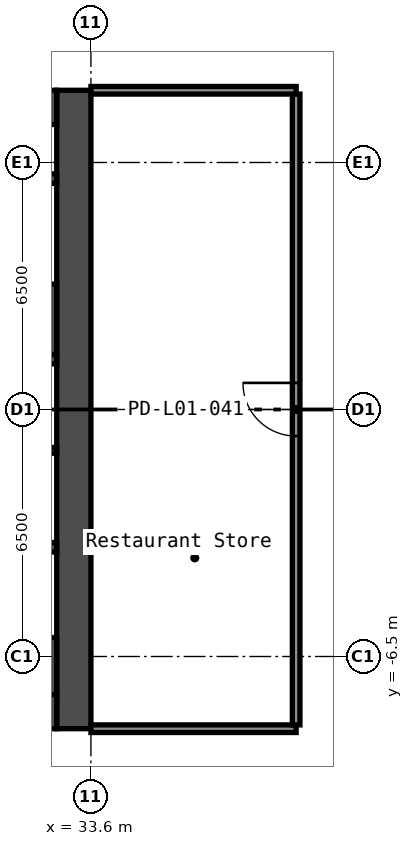
"""IFC4 building model, lengths in metres.
Left out: names, types, materials, properties, quantities, classifications, styles, units other than length and angle.
Written with IfcOpenShell. Run it as: python <this file> out.ifc"""

import sys

from ifc_helpers import new_model, si_unit, direction, frame, frame_2d, origin, place, context, subcontext, project, spatial, rectangle, extrude, element, fill, save


model = new_model("IFC4")
c1 = context("Model", 3, precision=1e-05, world=origin(), true_north=direction((0.0, 1.0)))
c2 = subcontext(c1, "Body", "Model", "MODEL_VIEW")
j1 = project(units=[si_unit("LENGTHUNIT", "METRE"), si_unit("PLANEANGLEUNIT", "RADIAN")], contexts=[c1])
p1 = place(None, origin())
s1 = spatial("IfcSite", under=j1, at=p1, CompositionType="ELEMENT")
p2 = place(p1, origin())
s2 = spatial("IfcBuilding", under=s1, at=p2, CompositionType="ELEMENT")
p3 = place(p2, origin())
s3 = spatial("IfcBuildingStorey", under=s2, at=p3, CompositionType="ELEMENT", Elevation=0.0)
p4 = place(p3, frame((33.15, -8.4, 0.0), z_axis=(0.0, 0.0, 1.0), x_axis=(0.0, 1.0, 0.0)))
e1 = element("IfcWall", 1, at=p4, inside=s3, PredefinedType="SHEAR", context=c2, shape_type="SweptSolid", body=[
    extrude(rectangle(XDim=16.8, YDim=0.9, at=frame_2d((8.4, 0.0))), origin(), (0.0, 0.0, 1.0), 8.6),
])
p5 = place(p3, frame((17.7, 7.95, 0.0), z_axis=(0.0, 0.0, 1.0), x_axis=(1.0, 0.0, 0.0)))
e2 = element("IfcWall", 2, at=p5, inside=s3, PredefinedType="SHEAR", context=c2, shape_type="SweptSolid", body=[
    extrude(rectangle(XDim=15.0, YDim=0.9, at=frame_2d((7.5, 0.0))), origin(), (0.0, 0.0, 1.0), 8.6),
])
p6 = place(p5, frame((10.4, 0.0, 0.0)))
e3 = element("IfcOpeningElement", 3, at=p6, cuts=e2, PredefinedType="OPENING", context=c2, shape_type="SweptSolid", body=[
    extrude(rectangle(XDim=1.2, YDim=2.1, at=frame_2d((0.6, 1.05))), frame((0.0, 0.46, 0.0), z_axis=(0.0, -1.0, 0.0), x_axis=(1.0, 0.0, 0.0)), (0.0, 0.0, 1.0), 0.92),
])
p7 = place(p5, frame((13.35, 0.0, 0.0)))
e4 = element("IfcOpeningElement", 4, at=p7, cuts=e2, PredefinedType="OPENING", context=c2, shape_type="SweptSolid", body=[
    extrude(rectangle(XDim=0.9, YDim=2.1, at=frame_2d((0.45, 1.05))), frame((0.0, 0.46, 0.0), z_axis=(0.0, -1.0, 0.0), x_axis=(1.0, 0.0, 0.0)), (0.0, 0.0, 1.0), 0.92),
])
p8 = place(p5, frame((6.75, 0.0, 0.0)))
e5 = element("IfcOpeningElement", 5, at=p8, cuts=e2, PredefinedType="OPENING", context=c2, shape_type="SweptSolid", body=[
    extrude(rectangle(XDim=1.2, YDim=2.1, at=frame_2d((0.6, 1.05))), frame((0.0, 0.46, 0.0), z_axis=(0.0, -1.0, 0.0), x_axis=(1.0, 0.0, 0.0)), (0.0, 0.0, 1.0), 0.92),
])
p9 = place(p3, frame((17.7, -7.95, 0.0), z_axis=(0.0, 0.0, 1.0), x_axis=(1.0, 0.0, 0.0)))
e6 = element("IfcWall", 6, at=p9, inside=s3, PredefinedType="SHEAR", context=c2, shape_type="SweptSolid", body=[
    extrude(rectangle(XDim=15.0, YDim=0.9, at=frame_2d((7.5, 0.0))), origin(), (0.0, 0.0, 1.0), 8.6),
])
p10 = place(p9, frame((2.55, 0.0, 0.0)))
e7 = element("IfcOpeningElement", 7, at=p10, cuts=e6, PredefinedType="OPENING", context=c2, shape_type="SweptSolid", body=[
    extrude(rectangle(XDim=1.0, YDim=2.1, at=frame_2d((0.5, 1.05))), frame((0.0, 0.46, 0.0), z_axis=(0.0, -1.0, 0.0), x_axis=(1.0, 0.0, 0.0)), (0.0, 0.0, 1.0), 0.92),
])
p11 = place(p9, frame((4.2, 0.0, 0.0)))
e8 = element("IfcOpeningElement", 8, at=p11, cuts=e6, PredefinedType="OPENING", context=c2, shape_type="SweptSolid", body=[
    extrude(rectangle(XDim=1.2, YDim=2.1, at=frame_2d((0.6, 1.05))), frame((0.0, 0.46, 0.0), z_axis=(0.0, -1.0, 0.0), x_axis=(1.0, 0.0, 0.0)), (0.0, 0.0, 1.0), 0.92),
])
p12 = place(p3, frame((27.65, 1.325, 0.0), z_axis=(0.0, 0.0, 1.0), x_axis=(1.0, 0.0, 0.0)))
e9 = element("IfcWall", 9, at=p12, inside=s3, PredefinedType="SHEAR", context=c2, shape_type="SweptSolid", body=[
    extrude(rectangle(XDim=5.05, YDim=0.25, at=frame_2d((2.525, 0.0))), origin(), (0.0, 0.0, 1.0), 8.6),
])
p13 = place(p12, frame((0.55, 0.0, 0.0)))
e10 = element("IfcOpeningElement", 10, at=p13, cuts=e9, PredefinedType="OPENING", context=c2, shape_type="SweptSolid", body=[
    extrude(rectangle(XDim=1.2, YDim=2.1, at=frame_2d((0.6, 1.05))), frame((0.0, 0.135, 0.0), z_axis=(0.0, -1.0, 0.0), x_axis=(1.0, 0.0, 0.0)), (0.0, 0.0, 1.0), 0.27),
])
p14 = place(p3, frame((30.3, 2.375, 0.0), z_axis=(0.0, 0.0, 1.0), x_axis=(1.0, 0.0, 0.0)))
e11 = element("IfcWall", 11, at=p14, inside=s3, PredefinedType="SHEAR", context=c2, shape_type="SweptSolid", body=[
    extrude(rectangle(XDim=2.4, YDim=1.85, at=frame_2d((1.2, 0.0))), origin(), (0.0, 0.0, 1.0), 8.6),
])
p15 = place(p3, frame((30.3, 6.075, 0.0), z_axis=(0.0, 0.0, 1.0), x_axis=(1.0, 0.0, 0.0)))
e12 = element("IfcWall", 12, at=p15, inside=s3, PredefinedType="SHEAR", context=c2, shape_type="SweptSolid", body=[
    extrude(rectangle(XDim=2.4, YDim=0.25, at=frame_2d((1.2, 0.0))), origin(), (0.0, 0.0, 1.0), 8.6),
])
p16 = place(p3, frame((28.15, -3.625, 0.0), z_axis=(0.0, 0.0, 1.0), x_axis=(1.0, 0.0, 0.0)))
e13 = element("IfcWall", 13, at=p16, inside=s3, PredefinedType="SHEAR", context=c2, shape_type="SweptSolid", body=[
    extrude(rectangle(XDim=4.55, YDim=0.25, at=frame_2d((2.275, 0.0))), origin(), (0.0, 0.0, 1.0), 8.6),
])
p17 = place(p16, frame((0.6, 0.0, 0.0)))
e14 = element("IfcOpeningElement", 14, at=p17, cuts=e13, PredefinedType="OPENING", context=c2, shape_type="SweptSolid", body=[
    extrude(rectangle(XDim=1.1, YDim=2.1, at=frame_2d((0.55, 1.05))), frame((0.0, 0.135, 0.0), z_axis=(0.0, -1.0, 0.0), x_axis=(1.0, 0.0, 0.0)), (0.0, 0.0, 1.0), 0.27),
])
p18 = place(p16, frame((2.85, 0.0, 0.0)))
e15 = element("IfcOpeningElement", 15, at=p18, cuts=e13, PredefinedType="OPENING", context=c2, shape_type="SweptSolid", body=[
    extrude(rectangle(XDim=1.1, YDim=2.1, at=frame_2d((0.55, 1.05))), frame((0.0, 0.135, 0.0), z_axis=(0.0, -1.0, 0.0), x_axis=(1.0, 0.0, 0.0)), (0.0, 0.0, 1.0), 0.27),
])
p19 = place(p3, frame((28.15, -6.75, 0.0), z_axis=(0.0, 0.0, 1.0), x_axis=(1.0, 0.0, 0.0)))
e16 = element("IfcWall", 16, at=p19, inside=s3, PredefinedType="SHEAR", context=c2, shape_type="SweptSolid", body=[
    extrude(rectangle(XDim=4.55, YDim=1.5, at=frame_2d((2.275, 0.0))), origin(), (0.0, 0.0, 1.0), 8.6),
])
p20 = place(p3, frame((29.7, -1.075, 0.0), z_axis=(0.0, 0.0, 1.0), x_axis=(1.0, 0.0, 0.0)))
e17 = element("IfcWall", 17, at=p20, inside=s3, PredefinedType="PARTITIONING", context=c2, shape_type="SweptSolid", body=[
    extrude(rectangle(XDim=3.0, YDim=0.15, at=frame_2d((1.5, 0.0))), origin(), (0.0, 0.0, 1.0), 8.6),
])
p21 = place(p3, frame((33.6, -8.4, 0.0), z_axis=(0.0, 0.0, 1.0), x_axis=(1.0, 0.0, 0.0)))
e18 = element("IfcWall", 18, at=p21, inside=s3, PredefinedType="PARTITIONING", context=c2, shape_type="SweptSolid", body=[
    extrude(rectangle(XDim=5.4, YDim=0.2, at=frame_2d((2.7, 0.0))), origin(), (0.0, 0.0, 1.0), 8.6),
])
p22 = place(p3, frame((39.0, -8.3, 0.0), z_axis=(0.0, 0.0, 1.0), x_axis=(0.0, 1.0, 0.0)))
e19 = element("IfcWall", 19, at=p22, inside=s3, PredefinedType="PARTITIONING", context=c2, shape_type="SweptSolid", body=[
    extrude(rectangle(XDim=16.6, YDim=0.2, at=frame_2d((8.3, 0.0))), origin(), (0.0, 0.0, 1.0), 8.6),
])
p23 = place(p22, frame((7.6, 0.0, 0.0)))
e20 = element("IfcOpeningElement", 20, at=p23, cuts=e19, PredefinedType="OPENING", context=c2, shape_type="SweptSolid", body=[
    extrude(rectangle(XDim=1.4, YDim=2.1, at=frame_2d((0.7, 1.05))), frame((0.0, 0.11, 0.0), z_axis=(0.0, -1.0, 0.0), x_axis=(1.0, 0.0, 0.0)), (0.0, 0.0, 1.0), 0.22),
])
p24 = place(p3, frame((39.0, 8.4, 0.0), z_axis=(0.0, 0.0, 1.0), x_axis=(-1.0, 0.0, 0.0)))
e21 = element("IfcWall", 21, at=p24, inside=s3, PredefinedType="PARTITIONING", context=c2, shape_type="SweptSolid", body=[
    extrude(rectangle(XDim=5.4, YDim=0.2, at=frame_2d((2.7, 0.0))), origin(), (0.0, 0.0, 1.0), 8.6),
])
p25 = place(p23, origin())
e22 = element("IfcDoor", 22, at=p25, inside=s3, OperationType="SINGLE_SWING_LEFT", PredefinedType="DOOR", context=c2, shape_type="SweptSolid", body=[
    extrude(rectangle(XDim=1.4, YDim=2.1, at=frame_2d((0.7, 1.05))), frame((0.0, 0.025, 0.0), z_axis=(0.0, -1.0, 0.0), x_axis=(1.0, 0.0, 0.0)), (0.0, 0.0, 1.0), 0.05),
])
fill(e20, e22)
save(model, sys.argv[1])
